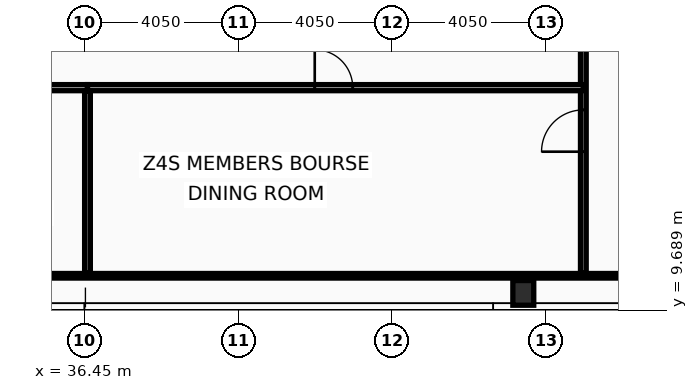
"""IFC4 building model, lengths in metres.
Left out: names, types, materials, properties, quantities, classifications, styles, units other than length and angle.
Written with IfcOpenShell. Run it as: python <this file> out.ifc"""

import sys

from ifc_helpers import new_model, si_unit, direction, frame, frame_2d, origin, origin_2d, place, context, subcontext, project, spatial, rectangle, hollow_rectangle, extrude, element, fill, save


model = new_model("IFC4")
c1 = context("Model", 3, precision=1e-05, world=origin(), true_north=direction((0.0, 1.0)))
c2 = subcontext(c1, "Body", "Model", "MODEL_VIEW")
j1 = project(units=[si_unit("LENGTHUNIT", "METRE"), si_unit("PLANEANGLEUNIT", "RADIAN")], contexts=[c1])
p1 = place(None, origin())
s1 = spatial("IfcSite", under=j1, at=p1, CompositionType="ELEMENT")
p2 = place(p1, origin())
s2 = spatial("IfcBuilding", under=s1, at=p2, CompositionType="ELEMENT")
p3 = place(p2, frame((0.0, 0.0, 343.4)))
s3 = spatial("IfcBuildingStorey", under=s2, at=p3, CompositionType="ELEMENT", Elevation=343.4)
p4 = place(p3, frame((48.0, 10.15, 0.0), z_axis=(0.0, 0.0, 1.0), x_axis=(1.0, 0.0, 0.0)))
e1 = element("IfcColumn", 1, at=p4, inside=s3, PredefinedType="COLUMN", context=c2, shape_type="SweptSolid", body=[
    extrude(hollow_rectangle(XDim=0.55, YDim=0.65, WallThickness=0.04, at=origin_2d()), origin(), (0.0, 0.0, 1.0), 3.6),
])
p5 = place(p3, frame((49.58, 10.665, 0.0), z_axis=(0.0, 0.0, 1.0), x_axis=(0.0, 1.0, 0.0)))
e2 = element("IfcWall", 2, at=p5, inside=s3, PredefinedType="PARTITIONING", context=c2, shape_type="SweptSolid", body=[
    extrude(rectangle(XDim=24.955, YDim=0.15, at=frame_2d((12.478, 0.0))), origin(), (0.0, 0.0, 1.0), 3.07),
])
p6 = place(p5, frame((3.2, 0.0, 0.0)))
e3 = element("IfcOpeningElement", 3, at=p6, cuts=e2, PredefinedType="OPENING", context=c2, shape_type="SweptSolid", body=[
    extrude(rectangle(XDim=1.1, YDim=2.1, at=frame_2d((0.55, 1.05))), frame((0.0, 0.085, 0.0), z_axis=(0.0, -1.0, 0.0), x_axis=(1.0, 0.0, 0.0)), (0.0, 0.0, 1.0), 0.17),
])
p7 = place(p3, frame((29.376, 15.55, 0.0), z_axis=(0.0, 0.0, 1.0), x_axis=(1.0, 0.0, 0.0)))
e4 = element("IfcWall", 4, at=p7, inside=s3, PredefinedType="PARTITIONING", context=c2, shape_type="SweptSolid", body=[
    extrude(rectangle(XDim=7.155, YDim=0.16, at=frame_2d((3.578, 0.0))), origin(), (0.0, 0.0, 1.0), 3.07),
])
p8 = place(p7, frame((3.505, 0.0, 0.0)))
e5 = element("IfcOpeningElement", 5, at=p8, cuts=e4, PredefinedType="OPENING", context=c2, shape_type="SweptSolid", body=[
    extrude(rectangle(XDim=1.0, YDim=2.05, at=frame_2d((0.5, 1.025))), frame((0.0, 0.09, 0.0), z_axis=(0.0, -1.0, 0.0), x_axis=(1.0, 0.0, 0.0)), (0.0, 0.0, 1.0), 0.18),
])
p9 = place(p3, frame((36.532, 15.55, 0.0), z_axis=(0.0, 0.0, 1.0), x_axis=(1.0, 0.0, 0.0)))
e6 = element("IfcWall", 6, at=p9, inside=s3, PredefinedType="PARTITIONING", context=c2, shape_type="SweptSolid", body=[
    extrude(rectangle(XDim=13.048, YDim=0.16, at=frame_2d((6.524, 0.0))), origin(), (0.0, 0.0, 1.0), 2.83),
])
p10 = place(p9, frame((5.98, 0.0, 0.0)))
e7 = element("IfcOpeningElement", 7, at=p10, cuts=e6, PredefinedType="OPENING", context=c2, shape_type="SweptSolid", body=[
    extrude(rectangle(XDim=1.0, YDim=2.05, at=frame_2d((0.5, 1.025))), frame((0.0, 0.09, 0.0), z_axis=(0.0, -1.0, 0.0), x_axis=(1.0, 0.0, 0.0)), (0.0, 0.0, 1.0), 0.18),
])
p11 = place(p3, frame((36.532, 10.665, 0.0), z_axis=(0.0, 0.0, 1.0), x_axis=(0.0, 1.0, 0.0)))
e8 = element("IfcWall", 8, at=p11, inside=s3, PredefinedType="PARTITIONING", context=c2, shape_type="SweptSolid", body=[
    extrude(rectangle(XDim=4.8, YDim=0.15, at=frame_2d((2.4, 0.0))), origin(), (0.0, 0.0, 1.0), 3.07),
])
p12 = place(p3, frame((12.095, 10.6, 0.0), z_axis=(0.0, 0.0, 1.0), x_axis=(1.0, 0.0, 0.0)))
e9 = element("IfcWall", 9, at=p12, inside=s3, PredefinedType="PARTITIONING", context=c2, shape_type="SweptSolid", body=[
    extrude(rectangle(XDim=48.71, YDim=0.12, at=frame_2d((24.355, 0.0))), origin(), (0.0, 0.0, 1.0), 2.83),
])
p13 = place(p6, origin())
e10 = element("IfcDoor", 10, at=p13, inside=s3, OperationType="SINGLE_SWING_LEFT", PredefinedType="DOOR", context=c2, shape_type="SweptSolid", body=[
    extrude(rectangle(XDim=1.1, YDim=2.1, at=frame_2d((0.55, 1.05))), frame((0.0, 0.025, 0.0), z_axis=(0.0, -1.0, 0.0), x_axis=(1.0, 0.0, 0.0)), (0.0, 0.0, 1.0), 0.05),
])
fill(e3, e10)
p14 = place(p10, origin())
e11 = element("IfcDoor", 11, at=p14, inside=s3, OperationType="SINGLE_SWING_LEFT", PredefinedType="DOOR", context=c2, shape_type="SweptSolid", body=[
    extrude(rectangle(XDim=1.0, YDim=2.05, at=frame_2d((0.5, 1.025))), frame((0.0, 0.025, 0.0), z_axis=(0.0, -1.0, 0.0), x_axis=(1.0, 0.0, 0.0)), (0.0, 0.0, 1.0), 0.05),
])
fill(e7, e11)
save(model, sys.argv[1])
